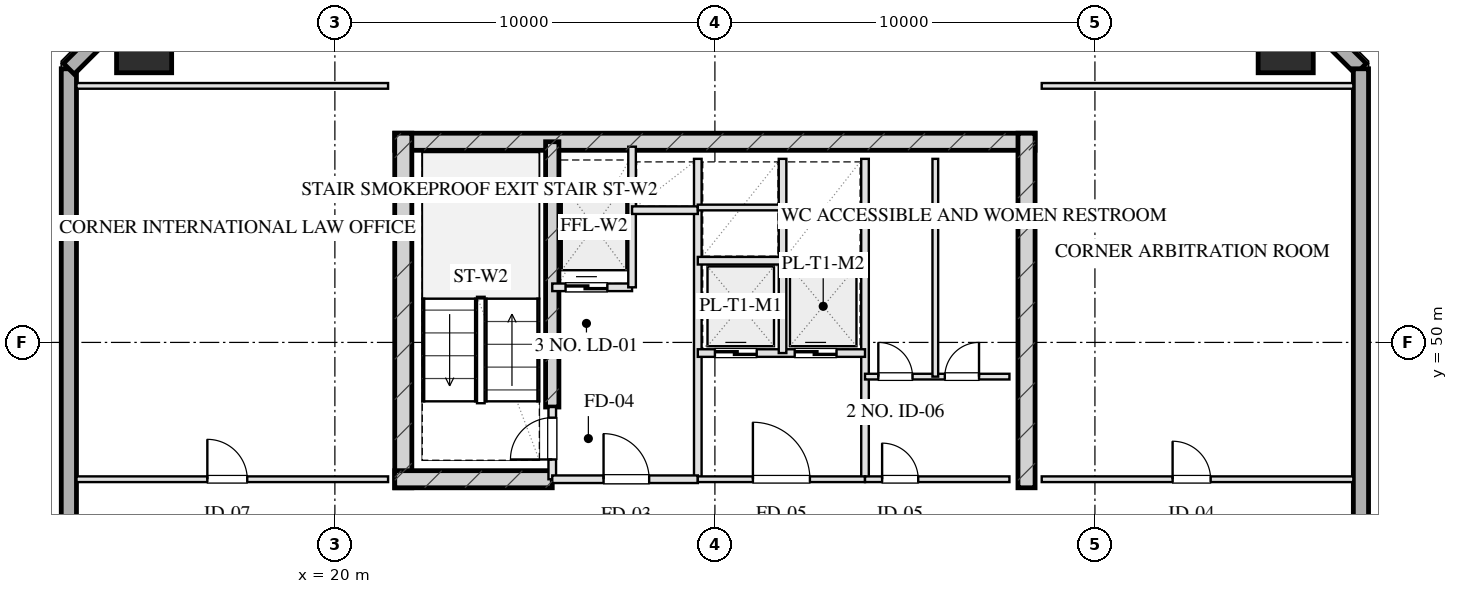
"""IFC4 building model, lengths in metres.
Left out: names, types, materials, properties, quantities, classifications, styles, units other than length and angle.
Written with IfcOpenShell. Run it as: python <this file> out.ifc"""

import sys

from ifc_helpers import new_model, si_unit, direction, frame, frame_2d, origin, origin_2d, place, context, subcontext, project, spatial, rectangle, hollow_rectangle, extrude, element, fill, save


model = new_model("IFC4")
c1 = context("Model", 3, precision=1e-05, world=origin(), true_north=direction((0.0, 1.0)))
c2 = subcontext(c1, "Body", "Model", "MODEL_VIEW")
j1 = project(units=[si_unit("LENGTHUNIT", "METRE"), si_unit("PLANEANGLEUNIT", "RADIAN")], contexts=[c1])
p1 = place(None, origin())
s1 = spatial("IfcSite", under=j1, at=p1, CompositionType="ELEMENT")
p2 = place(p1, origin())
s2 = spatial("IfcBuilding", under=s1, at=p2, CompositionType="ELEMENT")
p3 = place(p2, frame((0.0, 0.0, 192.05)))
s3 = spatial("IfcBuildingStorey", under=s2, at=p3, CompositionType="ELEMENT", Elevation=192.05)
p4 = place(p3, frame((21.575, 55.28, 0.0), z_axis=(0.0, 0.0, 1.0), x_axis=(1.0, 0.0, 0.0)))
e1 = element("IfcWall", 1, at=p4, inside=s3, PredefinedType="SHEAR", context=c2, shape_type="SweptSolid", body=[
    extrude(rectangle(XDim=16.85, YDim=0.45, at=frame_2d((8.425, 0.0))), origin(), (0.0, 0.0, 1.0), 3.45),
])
for number, where, z_axis, x_axis in (
    (2, (21.8, 46.175, 0.0), (0.0, 0.0, 1.0), (0.0, 1.0, 0.0)),
    (3, (38.2, 46.175, 0.0), (0.0, 0.0, 1.0), (0.0, 1.0, 0.0)),
):
    element("IfcWall", number, at=place(p3, frame(where, z_axis=z_axis, x_axis=x_axis)), inside=s3, PredefinedType="SHEAR", context=c2, shape_type="SweptSolid", body=[
        extrude(rectangle(XDim=9.33, YDim=0.45, at=frame_2d((4.665, 0.0))), origin(), (0.0, 0.0, 1.0), 3.45),
    ])
p5 = place(p3, frame((25.72, 48.3, 0.0), z_axis=(0.0, 0.0, 1.0), x_axis=(0.0, 1.0, 0.0)))
e4 = element("IfcWall", 4, at=p5, inside=s3, PredefinedType="SHEAR", context=c2, shape_type="SweptSolid", body=[
    extrude(rectangle(XDim=6.98, YDim=0.35, at=frame_2d((3.49, 0.0))), origin(), (0.0, 0.0, 1.0), 3.45),
])
p6 = place(p3, frame((21.575, 46.4, 0.0), z_axis=(0.0, 0.0, 1.0), x_axis=(1.0, 0.0, 0.0)))
e5 = element("IfcWall", 5, at=p6, inside=s3, PredefinedType="SHEAR", context=c2, shape_type="SweptSolid", body=[
    extrude(rectangle(XDim=4.145, YDim=0.45, at=frame_2d((2.073, 0.0))), origin(), (0.0, 0.0, 1.0), 3.45),
])
for number, where, z_axis, x_axis in (
    (6, (45.02, 57.82, 0.0), (0.0, 0.0, 1.0), (1.0, 0.0, 0.0)),
    (7, (14.98, 57.82, 0.0), (0.0, 0.0, 1.0), (1.0, 0.0, 0.0)),
):
    element("IfcColumn", number, at=place(p3, frame(where, z_axis=z_axis, x_axis=x_axis)), inside=s3, PredefinedType="COLUMN", context=c2, shape_type="SweptSolid", body=[
        extrude(hollow_rectangle(XDim=1.45, YDim=1.45, WallThickness=0.05, at=origin_2d()), origin(), (0.0, 0.0, 1.0), 3.451),
    ])
p7 = place(p3, frame((13.0, 10.8, 0.0), z_axis=(0.0, 0.0, 1.0), x_axis=(0.0, 1.0, 0.0)))
e8 = element("IfcWall", 8, at=p7, inside=s3, PredefinedType="SOLIDWALL", context=c2, shape_type="SweptSolid", body=[
    extrude(rectangle(XDim=46.4, YDim=0.4, at=frame_2d((23.2, 0.0))), origin(), (0.0, 0.0, 1.0), 2.61),
])
p8 = place(p7, frame((15.75, 0.0, 0.75)))
e9 = element("IfcOpeningElement", 9, at=p8, cuts=e8, PredefinedType="OPENING", context=c2, shape_type="SweptSolid", body=[
    extrude(rectangle(XDim=2.1, YDim=1.46, at=frame_2d((1.05, 0.73))), frame((0.0, 0.21, 0.0), z_axis=(0.0, -1.0, 0.0), x_axis=(1.0, 0.0, 0.0)), (0.0, 0.0, 1.0), 0.42),
])
p9 = place(p7, frame((19.55, 0.0, 0.75)))
e10 = element("IfcOpeningElement", 10, at=p9, cuts=e8, PredefinedType="OPENING", context=c2, shape_type="SweptSolid", body=[
    extrude(rectangle(XDim=2.1, YDim=1.46, at=frame_2d((1.05, 0.73))), frame((0.0, 0.21, 0.0), z_axis=(0.0, -1.0, 0.0), x_axis=(1.0, 0.0, 0.0)), (0.0, 0.0, 1.0), 0.42),
])
p10 = place(p7, frame((24.75, 0.0, 0.75)))
e11 = element("IfcOpeningElement", 11, at=p10, cuts=e8, PredefinedType="OPENING", context=c2, shape_type="SweptSolid", body=[
    extrude(rectangle(XDim=2.1, YDim=1.46, at=frame_2d((1.05, 0.73))), frame((0.0, 0.21, 0.0), z_axis=(0.0, -1.0, 0.0), x_axis=(1.0, 0.0, 0.0)), (0.0, 0.0, 1.0), 0.42),
])
p11 = place(p7, frame((28.55, 0.0, 0.75)))
e12 = element("IfcOpeningElement", 12, at=p11, cuts=e8, PredefinedType="OPENING", context=c2, shape_type="SweptSolid", body=[
    extrude(rectangle(XDim=2.1, YDim=1.46, at=frame_2d((1.05, 0.73))), frame((0.0, 0.21, 0.0), z_axis=(0.0, -1.0, 0.0), x_axis=(1.0, 0.0, 0.0)), (0.0, 0.0, 1.0), 0.42),
])
for number, where, z_axis, x_axis in (
    (13, (13.0, 57.2, 0.0), (0.0, 0.0, 1.0), (0.707, 0.707, 0.0)),
    (14, (44.4, 59.8, 0.0), (0.0, 0.0, 1.0), (0.707, -0.707, 0.0)),
):
    element("IfcWall", number, at=place(p3, frame(where, z_axis=z_axis, x_axis=x_axis)), inside=s3, PredefinedType="SOLIDWALL", context=c2, shape_type="SweptSolid", body=[
        extrude(rectangle(XDim=3.677, YDim=0.4, at=frame_2d((1.838, 0.0))), origin(), (0.0, 0.0, 1.0), 2.61),
    ])
p12 = place(p3, frame((47.0, 57.2, 0.0), z_axis=(0.0, 0.0, 1.0), x_axis=(0.0, -1.0, 0.0)))
e15 = element("IfcWall", 15, at=p12, inside=s3, PredefinedType="SOLIDWALL", context=c2, shape_type="SweptSolid", body=[
    extrude(rectangle(XDim=46.4, YDim=0.4, at=frame_2d((23.2, 0.0))), origin(), (0.0, 0.0, 1.0), 2.61),
])
p13 = place(p12, frame((28.55, 0.0, 0.75)))
e16 = element("IfcOpeningElement", 16, at=p13, cuts=e15, PredefinedType="OPENING", context=c2, shape_type="SweptSolid", body=[
    extrude(rectangle(XDim=2.1, YDim=1.46, at=frame_2d((1.05, 0.73))), frame((0.0, 0.21, 0.0), z_axis=(0.0, -1.0, 0.0), x_axis=(1.0, 0.0, 0.0)), (0.0, 0.0, 1.0), 0.42),
])
p14 = place(p12, frame((24.75, 0.0, 0.75)))
e17 = element("IfcOpeningElement", 17, at=p14, cuts=e15, PredefinedType="OPENING", context=c2, shape_type="SweptSolid", body=[
    extrude(rectangle(XDim=2.1, YDim=1.46, at=frame_2d((1.05, 0.73))), frame((0.0, 0.21, 0.0), z_axis=(0.0, -1.0, 0.0), x_axis=(1.0, 0.0, 0.0)), (0.0, 0.0, 1.0), 0.42),
])
p15 = place(p12, frame((19.55, 0.0, 0.75)))
e18 = element("IfcOpeningElement", 18, at=p15, cuts=e15, PredefinedType="OPENING", context=c2, shape_type="SweptSolid", body=[
    extrude(rectangle(XDim=2.1, YDim=1.46, at=frame_2d((1.05, 0.73))), frame((0.0, 0.21, 0.0), z_axis=(0.0, -1.0, 0.0), x_axis=(1.0, 0.0, 0.0)), (0.0, 0.0, 1.0), 0.42),
])
p16 = place(p12, frame((15.75, 0.0, 0.75)))
e19 = element("IfcOpeningElement", 19, at=p16, cuts=e15, PredefinedType="OPENING", context=c2, shape_type="SweptSolid", body=[
    extrude(rectangle(XDim=2.1, YDim=1.46, at=frame_2d((1.05, 0.73))), frame((0.0, 0.21, 0.0), z_axis=(0.0, -1.0, 0.0), x_axis=(1.0, 0.0, 0.0)), (0.0, 0.0, 1.0), 0.42),
])
p17 = place(p3, frame((25.72, 46.4, 0.0), z_axis=(0.0, 0.0, 1.0), x_axis=(0.0, 1.0, 0.0)))
e20 = element("IfcWall", 20, at=p17, inside=s3, PredefinedType="PARTITIONING", context=c2, shape_type="SweptSolid", body=[
    extrude(rectangle(XDim=1.9, YDim=0.2, at=frame_2d((0.95, 0.0))), origin(), (0.0, 0.0, 1.0), 3.175),
])
p18 = place(p17, frame((0.52, 0.0, 0.0)))
e21 = element("IfcOpeningElement", 21, at=p18, cuts=e20, PredefinedType="OPENING", context=c2, shape_type="SweptSolid", body=[
    extrude(rectangle(XDim=1.1, YDim=2.05, at=frame_2d((0.55, 1.025))), frame((0.0, 0.11, 0.0), z_axis=(0.0, -1.0, 0.0), x_axis=(1.0, 0.0, 0.0)), (0.0, 0.0, 1.0), 0.22),
])
p19 = place(p3, frame((29.55, 46.4, 0.0), z_axis=(0.0, 0.0, 1.0), x_axis=(0.0, 1.0, 0.0)))
e22 = element("IfcWall", 22, at=p19, inside=s3, PredefinedType="PARTITIONING", context=c2, shape_type="SweptSolid", body=[
    extrude(rectangle(XDim=8.43, YDim=0.2, at=frame_2d((4.215, 0.0))), origin(), (0.0, 0.0, 1.0), 3.175),
])
p20 = place(p3, frame((25.72, 46.4, 0.0), z_axis=(0.0, 0.0, 1.0), x_axis=(1.0, 0.0, 0.0)))
e23 = element("IfcWall", 23, at=p20, inside=s3, PredefinedType="PARTITIONING", context=c2, shape_type="SweptSolid", body=[
    extrude(rectangle(XDim=3.83, YDim=0.2, at=frame_2d((1.915, 0.0))), origin(), (0.0, 0.0, 1.0), 3.175),
])
p21 = place(p20, frame((1.35, 0.0, 0.0)))
e24 = element("IfcOpeningElement", 24, at=p21, cuts=e23, PredefinedType="OPENING", context=c2, shape_type="SweptSolid", body=[
    extrude(rectangle(XDim=1.2, YDim=2.05, at=frame_2d((0.6, 1.025))), frame((0.0, 0.11, 0.0), z_axis=(0.0, -1.0, 0.0), x_axis=(1.0, 0.0, 0.0)), (0.0, 0.0, 1.0), 0.22),
])
p22 = place(p3, frame((25.72, 51.45, 0.0), z_axis=(0.0, 0.0, 1.0), x_axis=(1.0, 0.0, 0.0)))
e25 = element("IfcWall", 25, at=p22, inside=s3, PredefinedType="PARTITIONING", context=c2, shape_type="SweptSolid", body=[
    extrude(rectangle(XDim=2.1, YDim=0.2, at=frame_2d((1.05, 0.0))), origin(), (0.0, 0.0, 1.0), 3.175),
])
p23 = place(p22, frame((0.35, 0.0, 0.0)))
e26 = element("IfcOpeningElement", 26, at=p23, cuts=e25, PredefinedType="OPENING", context=c2, shape_type="SweptSolid", body=[
    extrude(rectangle(XDim=1.1, YDim=2.05, at=frame_2d((0.55, 1.025))), frame((0.0, 0.11, 0.0), z_axis=(0.0, -1.0, 0.0), x_axis=(1.0, 0.0, 0.0)), (0.0, 0.0, 1.0), 0.22),
])
p24 = place(p3, frame((27.82, 51.45, 0.0), z_axis=(0.0, 0.0, 1.0), x_axis=(0.0, 1.0, 0.0)))
e27 = element("IfcWall", 27, at=p24, inside=s3, PredefinedType="PARTITIONING", context=c2, shape_type="SweptSolid", body=[
    extrude(rectangle(XDim=3.7, YDim=0.2, at=frame_2d((1.85, 0.0))), origin(), (0.0, 0.0, 1.0), 3.175),
])
p25 = place(p3, frame((27.82, 53.48, 0.0), z_axis=(0.0, 0.0, 1.0), x_axis=(1.0, 0.0, 0.0)))
e28 = element("IfcWall", 28, at=p25, inside=s3, PredefinedType="PARTITIONING", context=c2, shape_type="SweptSolid", body=[
    extrude(rectangle(XDim=1.73, YDim=0.2, at=frame_2d((0.865, 0.0))), origin(), (0.0, 0.0, 1.0), 3.175),
])
p26 = place(p3, frame((33.95, 46.4, 0.0), z_axis=(0.0, 0.0, 1.0), x_axis=(0.0, 1.0, 0.0)))
e29 = element("IfcWall", 29, at=p26, inside=s3, PredefinedType="PARTITIONING", context=c2, shape_type="SweptSolid", body=[
    extrude(rectangle(XDim=8.43, YDim=0.2, at=frame_2d((4.215, 0.0))), origin(), (0.0, 0.0, 1.0), 3.175),
])
p27 = place(p3, frame((29.55, 46.4, 0.0), z_axis=(0.0, 0.0, 1.0), x_axis=(1.0, 0.0, 0.0)))
e30 = element("IfcWall", 30, at=p27, inside=s3, PredefinedType="PARTITIONING", context=c2, shape_type="SweptSolid", body=[
    extrude(rectangle(XDim=4.4, YDim=0.15, at=frame_2d((2.2, 0.0))), origin(), (0.0, 0.0, 1.0), 3.175),
])
p28 = place(p27, frame((1.45, 0.0, 0.0)))
e31 = element("IfcOpeningElement", 31, at=p28, cuts=e30, PredefinedType="OPENING", context=c2, shape_type="SweptSolid", body=[
    extrude(rectangle(XDim=1.5, YDim=2.05, at=frame_2d((0.75, 1.025))), frame((0.0, 0.085, 0.0), z_axis=(0.0, -1.0, 0.0), x_axis=(1.0, 0.0, 0.0)), (0.0, 0.0, 1.0), 0.17),
])
p29 = place(p3, frame((29.55, 49.72, 0.0), z_axis=(0.0, 0.0, 1.0), x_axis=(1.0, 0.0, 0.0)))
e32 = element("IfcWall", 32, at=p29, inside=s3, PredefinedType="PARTITIONING", context=c2, shape_type="SweptSolid", body=[
    extrude(rectangle(XDim=4.4, YDim=0.2, at=frame_2d((2.2, 0.0))), origin(), (0.0, 0.0, 1.0), 3.175),
])
p30 = place(p29, frame((0.45, 0.0, 0.0)))
e33 = element("IfcOpeningElement", 33, at=p30, cuts=e32, PredefinedType="OPENING", context=c2, shape_type="SweptSolid", body=[
    extrude(rectangle(XDim=1.1, YDim=2.05, at=frame_2d((0.55, 1.025))), frame((0.0, 0.11, 0.0), z_axis=(0.0, -1.0, 0.0), x_axis=(1.0, 0.0, 0.0)), (0.0, 0.0, 1.0), 0.22),
])
p31 = place(p29, frame((2.55, 0.0, 0.0)))
e34 = element("IfcOpeningElement", 34, at=p31, cuts=e32, PredefinedType="OPENING", context=c2, shape_type="SweptSolid", body=[
    extrude(rectangle(XDim=1.1, YDim=2.05, at=frame_2d((0.55, 1.025))), frame((0.0, 0.11, 0.0), z_axis=(0.0, -1.0, 0.0), x_axis=(1.0, 0.0, 0.0)), (0.0, 0.0, 1.0), 0.22),
])
p32 = place(p3, frame((31.78, 49.72, 0.0), z_axis=(0.0, 0.0, 1.0), x_axis=(0.0, 1.0, 0.0)))
e35 = element("IfcWall", 35, at=p32, inside=s3, PredefinedType="PARTITIONING", context=c2, shape_type="SweptSolid", body=[
    extrude(rectangle(XDim=5.11, YDim=0.2, at=frame_2d((2.555, 0.0))), origin(), (0.0, 0.0, 1.0), 3.175),
])
p33 = place(p3, frame((29.55, 52.15, 0.0), z_axis=(0.0, 0.0, 1.0), x_axis=(1.0, 0.0, 0.0)))
e36 = element("IfcWall", 36, at=p33, inside=s3, PredefinedType="PARTITIONING", context=c2, shape_type="SweptSolid", body=[
    extrude(rectangle(XDim=4.4, YDim=0.2, at=frame_2d((2.2, 0.0))), origin(), (0.0, 0.0, 1.0), 3.175),
])
p34 = place(p3, frame((29.55, 53.55, 0.0), z_axis=(0.0, 0.0, 1.0), x_axis=(1.0, 0.0, 0.0)))
e37 = element("IfcWall", 37, at=p34, inside=s3, PredefinedType="PARTITIONING", context=c2, shape_type="SweptSolid", body=[
    extrude(rectangle(XDim=2.23, YDim=0.15, at=frame_2d((1.115, 0.0))), origin(), (0.0, 0.0, 1.0), 3.175),
])
p35 = place(p3, frame((33.95, 46.4, 0.0), z_axis=(0.0, 0.0, 1.0), x_axis=(1.0, 0.0, 0.0)))
e38 = element("IfcWall", 38, at=p35, inside=s3, PredefinedType="PARTITIONING", context=c2, shape_type="SweptSolid", body=[
    extrude(rectangle(XDim=3.8, YDim=0.15, at=frame_2d((1.9, 0.0))), origin(), (0.0, 0.0, 1.0), 3.175),
])
p36 = place(p35, frame((0.45, 0.0, 0.0)))
e39 = element("IfcOpeningElement", 39, at=p36, cuts=e38, PredefinedType="OPENING", context=c2, shape_type="SweptSolid", body=[
    extrude(rectangle(XDim=0.95, YDim=2.05, at=frame_2d((0.475, 1.025))), frame((0.0, 0.085, 0.0), z_axis=(0.0, -1.0, 0.0), x_axis=(1.0, 0.0, 0.0)), (0.0, 0.0, 1.0), 0.17),
])
p37 = place(p3, frame((33.95, 49.1, 0.0), z_axis=(0.0, 0.0, 1.0), x_axis=(1.0, 0.0, 0.0)))
e40 = element("IfcWall", 40, at=p37, inside=s3, PredefinedType="PARTITIONING", context=c2, shape_type="SweptSolid", body=[
    extrude(rectangle(XDim=3.8, YDim=0.15, at=frame_2d((1.9, 0.0))), origin(), (0.0, 0.0, 1.0), 3.175),
])
p38 = place(p37, frame((0.35, 0.0, 0.0)))
e41 = element("IfcOpeningElement", 41, at=p38, cuts=e40, PredefinedType="OPENING", context=c2, shape_type="SweptSolid", body=[
    extrude(rectangle(XDim=0.9, YDim=2.05, at=frame_2d((0.45, 1.025))), frame((0.0, 0.085, 0.0), z_axis=(0.0, -1.0, 0.0), x_axis=(1.0, 0.0, 0.0)), (0.0, 0.0, 1.0), 0.17),
])
p39 = place(p37, frame((2.1, 0.0, 0.0)))
e42 = element("IfcOpeningElement", 42, at=p39, cuts=e40, PredefinedType="OPENING", context=c2, shape_type="SweptSolid", body=[
    extrude(rectangle(XDim=0.9, YDim=2.05, at=frame_2d((0.45, 1.025))), frame((0.0, 0.085, 0.0), z_axis=(0.0, -1.0, 0.0), x_axis=(1.0, 0.0, 0.0)), (0.0, 0.0, 1.0), 0.17),
])
p40 = place(p3, frame((35.8, 49.1, 0.0), z_axis=(0.0, 0.0, 1.0), x_axis=(0.0, 1.0, 0.0)))
e43 = element("IfcWall", 43, at=p40, inside=s3, PredefinedType="PARTITIONING", context=c2, shape_type="SweptSolid", body=[
    extrude(rectangle(XDim=5.73, YDim=0.15, at=frame_2d((2.865, 0.0))), origin(), (0.0, 0.0, 1.0), 3.175),
])
p41 = place(p3, frame((13.2, 56.75, 0.0), z_axis=(0.0, 0.0, 1.0), x_axis=(1.0, 0.0, 0.0)))
e44 = element("IfcWall", 44, at=p41, inside=s3, PredefinedType="PARTITIONING", context=c2, shape_type="SweptSolid", body=[
    extrude(rectangle(XDim=8.2, YDim=0.15, at=frame_2d((4.1, 0.0))), origin(), (0.0, 0.0, 1.0), 3.175),
])
p42 = place(p3, frame((13.2, 46.4, 0.0), z_axis=(0.0, 0.0, 1.0), x_axis=(1.0, 0.0, 0.0)))
e45 = element("IfcWall", 45, at=p42, inside=s3, PredefinedType="PARTITIONING", context=c2, shape_type="SweptSolid", body=[
    extrude(rectangle(XDim=8.2, YDim=0.15, at=frame_2d((4.1, 0.0))), origin(), (0.0, 0.0, 1.0), 3.175),
])
p43 = place(p42, frame((3.444, 0.0, 0.0)))
e46 = element("IfcOpeningElement", 46, at=p43, cuts=e45, PredefinedType="OPENING", context=c2, shape_type="SweptSolid", body=[
    extrude(rectangle(XDim=1.05, YDim=2.05, at=frame_2d((0.525, 1.025))), frame((0.0, 0.085, 0.0), z_axis=(0.0, -1.0, 0.0), x_axis=(1.0, 0.0, 0.0)), (0.0, 0.0, 1.0), 0.17),
])
p44 = place(p3, frame((38.6, 56.75, 0.0), z_axis=(0.0, 0.0, 1.0), x_axis=(1.0, 0.0, 0.0)))
e47 = element("IfcWall", 47, at=p44, inside=s3, PredefinedType="PARTITIONING", context=c2, shape_type="SweptSolid", body=[
    extrude(rectangle(XDim=8.2, YDim=0.15, at=frame_2d((4.1, 0.0))), origin(), (0.0, 0.0, 1.0), 3.175),
])
p45 = place(p3, frame((38.6, 46.4, 0.0), z_axis=(0.0, 0.0, 1.0), x_axis=(1.0, 0.0, 0.0)))
e48 = element("IfcWall", 48, at=p45, inside=s3, PredefinedType="PARTITIONING", context=c2, shape_type="SweptSolid", body=[
    extrude(rectangle(XDim=8.2, YDim=0.15, at=frame_2d((4.1, 0.0))), origin(), (0.0, 0.0, 1.0), 3.175),
])
p46 = place(p45, frame((3.444, 0.0, 0.0)))
e49 = element("IfcOpeningElement", 49, at=p46, cuts=e48, PredefinedType="OPENING", context=c2, shape_type="SweptSolid", body=[
    extrude(rectangle(XDim=1.0, YDim=2.05, at=frame_2d((0.5, 1.025))), frame((0.0, 0.085, 0.0), z_axis=(0.0, -1.0, 0.0), x_axis=(1.0, 0.0, 0.0)), (0.0, 0.0, 1.0), 0.17),
])
p47 = place(p18, origin())
e50 = element("IfcDoor", 50, at=p47, inside=s3, OperationType="SINGLE_SWING_LEFT", PredefinedType="DOOR", context=c2, shape_type="SweptSolid", body=[
    extrude(rectangle(XDim=1.1, YDim=2.05, at=frame_2d((0.55, 1.025))), frame((0.0, 0.025, 0.0), z_axis=(0.0, -1.0, 0.0), x_axis=(1.0, 0.0, 0.0)), (0.0, 0.0, 1.0), 0.05),
])
fill(e21, e50)
p48 = place(p21, origin())
e51 = element("IfcDoor", 51, at=p48, inside=s3, OperationType="SINGLE_SWING_LEFT", PredefinedType="DOOR", context=c2, shape_type="SweptSolid", body=[
    extrude(rectangle(XDim=1.2, YDim=2.05, at=frame_2d((0.6, 1.025))), frame((0.0, 0.025, 0.0), z_axis=(0.0, -1.0, 0.0), x_axis=(1.0, 0.0, 0.0)), (0.0, 0.0, 1.0), 0.05),
])
fill(e24, e51)
p49 = place(p23, origin())
e52 = element("IfcDoor", 52, at=p49, inside=s3, OperationType="DOUBLE_DOOR_SLIDING", PredefinedType="DOOR", context=c2, shape_type="SweptSolid", body=[
    extrude(rectangle(XDim=1.1, YDim=2.05, at=frame_2d((0.55, 1.025))), frame((0.0, 0.025, 0.0), z_axis=(0.0, -1.0, 0.0), x_axis=(1.0, 0.0, 0.0)), (0.0, 0.0, 1.0), 0.05),
])
fill(e26, e52)
p50 = place(p28, origin())
e53 = element("IfcDoor", 53, at=p50, inside=s3, OperationType="SINGLE_SWING_LEFT", PredefinedType="DOOR", context=c2, shape_type="SweptSolid", body=[
    extrude(rectangle(XDim=1.5, YDim=2.05, at=frame_2d((0.75, 1.025))), frame((0.0, 0.025, 0.0), z_axis=(0.0, -1.0, 0.0), x_axis=(1.0, 0.0, 0.0)), (0.0, 0.0, 1.0), 0.05),
])
fill(e31, e53)
p51 = place(p30, origin())
e54 = element("IfcDoor", 54, at=p51, inside=s3, OperationType="DOUBLE_DOOR_SLIDING", PredefinedType="DOOR", context=c2, shape_type="SweptSolid", body=[
    extrude(rectangle(XDim=1.1, YDim=2.05, at=frame_2d((0.55, 1.025))), frame((0.0, 0.025, 0.0), z_axis=(0.0, -1.0, 0.0), x_axis=(1.0, 0.0, 0.0)), (0.0, 0.0, 1.0), 0.05),
])
fill(e33, e54)
p52 = place(p31, origin())
e55 = element("IfcDoor", 55, at=p52, inside=s3, OperationType="DOUBLE_DOOR_SLIDING", PredefinedType="DOOR", context=c2, shape_type="SweptSolid", body=[
    extrude(rectangle(XDim=1.1, YDim=2.05, at=frame_2d((0.55, 1.025))), frame((0.0, 0.025, 0.0), z_axis=(0.0, -1.0, 0.0), x_axis=(1.0, 0.0, 0.0)), (0.0, 0.0, 1.0), 0.05),
])
fill(e34, e55)
p53 = place(p36, origin())
e56 = element("IfcDoor", 56, at=p53, inside=s3, OperationType="SINGLE_SWING_LEFT", PredefinedType="DOOR", context=c2, shape_type="SweptSolid", body=[
    extrude(rectangle(XDim=0.95, YDim=2.05, at=frame_2d((0.475, 1.025))), frame((0.0, 0.025, 0.0), z_axis=(0.0, -1.0, 0.0), x_axis=(1.0, 0.0, 0.0)), (0.0, 0.0, 1.0), 0.05),
])
fill(e39, e56)
p54 = place(p38, origin())
e57 = element("IfcDoor", 57, at=p54, inside=s3, OperationType="SINGLE_SWING_LEFT", PredefinedType="DOOR", context=c2, shape_type="SweptSolid", body=[
    extrude(rectangle(XDim=0.9, YDim=2.05, at=frame_2d((0.45, 1.025))), frame((0.0, 0.025, 0.0), z_axis=(0.0, -1.0, 0.0), x_axis=(1.0, 0.0, 0.0)), (0.0, 0.0, 1.0), 0.05),
])
fill(e41, e57)
p55 = place(p39, origin())
e58 = element("IfcDoor", 58, at=p55, inside=s3, OperationType="SINGLE_SWING_RIGHT", PredefinedType="DOOR", context=c2, shape_type="SweptSolid", body=[
    extrude(rectangle(XDim=0.9, YDim=2.05, at=frame_2d((0.45, 1.025))), frame((0.0, 0.025, 0.0), z_axis=(0.0, -1.0, 0.0), x_axis=(1.0, 0.0, 0.0)), (0.0, 0.0, 1.0), 0.05),
])
fill(e42, e58)
p56 = place(p43, origin())
e59 = element("IfcDoor", 59, at=p56, inside=s3, OperationType="SINGLE_SWING_LEFT", PredefinedType="DOOR", context=c2, shape_type="SweptSolid", body=[
    extrude(rectangle(XDim=1.05, YDim=2.05, at=frame_2d((0.525, 1.025))), frame((0.0, 0.025, 0.0), z_axis=(0.0, -1.0, 0.0), x_axis=(1.0, 0.0, 0.0)), (0.0, 0.0, 1.0), 0.05),
])
fill(e46, e59)
p57 = place(p46, origin())
e60 = element("IfcDoor", 60, at=p57, inside=s3, OperationType="SINGLE_SWING_LEFT", PredefinedType="DOOR", context=c2, shape_type="SweptSolid", body=[
    extrude(rectangle(XDim=1.0, YDim=2.05, at=frame_2d((0.5, 1.025))), frame((0.0, 0.025, 0.0), z_axis=(0.0, -1.0, 0.0), x_axis=(1.0, 0.0, 0.0)), (0.0, 0.0, 1.0), 0.05),
])
fill(e49, e60)
save(model, sys.argv[1])
